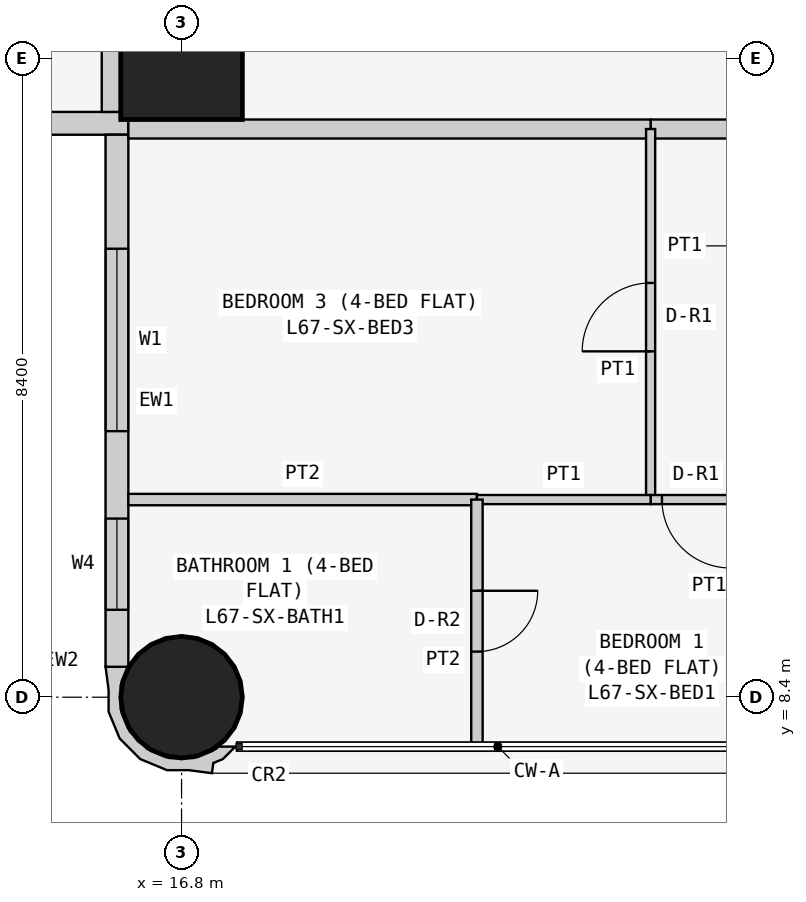
"""IFC4 building model, lengths in metres.
Left out: names, types, materials, properties, quantities, classifications, styles, units other than length and angle.
Written with IfcOpenShell. Run it as: python <this file> out.ifc"""

import sys

from ifc_helpers import new_model, si_unit, direction, frame, frame_2d, origin, origin_2d, place, context, subcontext, project, spatial, polyline, rectangle, circle, outline, extrude, element, fill, save


model = new_model("IFC4")
c1 = context("Model", 3, precision=1e-05, world=origin(), true_north=direction((0.0, 1.0)))
c2 = subcontext(c1, "Body", "Model", "MODEL_VIEW")
j1 = project(units=[si_unit("LENGTHUNIT", "METRE"), si_unit("PLANEANGLEUNIT", "RADIAN")], contexts=[c1])
p1 = place(None, origin())
s1 = spatial("IfcSite", under=j1, at=p1, CompositionType="ELEMENT")
p2 = place(p1, origin())
s2 = spatial("IfcBuilding", under=s1, at=p2, CompositionType="ELEMENT")
p3 = place(p2, frame((0.0, 0.0, 257.7)))
s3 = spatial("IfcBuildingStorey", under=s2, at=p3, CompositionType="ELEMENT", Elevation=257.7)
p4 = place(p3, frame((16.8, 8.4, 0.0), z_axis=(0.0, 0.0, 1.0), x_axis=(1.0, 0.0, 0.0)))
e1 = element("IfcColumn", 1, at=p4, inside=s3, PredefinedType="COLUMN", context=c2, shape_type="SweptSolid", body=[
    extrude(circle(Radius=0.8, at=origin_2d()), origin(), (0.0, 0.0, 1.0), 3.6),
])
p5 = place(p3, frame((16.8, 16.8, 0.0), z_axis=(0.0, 0.0, 1.0), x_axis=(1.0, 0.0, 0.0)))
e2 = element("IfcColumn", 2, at=p5, inside=s3, PredefinedType="COLUMN", context=c2, shape_type="SweptSolid", body=[
    extrude(rectangle(XDim=1.6, YDim=1.6, at=origin_2d()), origin(), (0.0, 0.0, 1.0), 3.6),
])
p6 = place(p3, frame((8.8, 15.95, 0.0), z_axis=(0.0, 0.0, 1.0), x_axis=(1.0, 0.0, 0.0)))
e3 = element("IfcWall", 3, at=p6, inside=s3, PredefinedType="SOLIDWALL", context=c2, shape_type="SweptSolid", body=[
    extrude(rectangle(XDim=7.3, YDim=0.3, at=frame_2d((3.65, 0.0))), origin(), (0.0, 0.0, 1.0), 3.45),
])
p7 = place(p6, frame((3.1, 0.0, 0.9)))
e4 = element("IfcOpeningElement", 4, at=p7, cuts=e3, PredefinedType="OPENING", context=c2, shape_type="SweptSolid", body=[
    extrude(rectangle(XDim=2.4, YDim=1.5, at=frame_2d((1.2, 0.75))), frame((0.0, 0.16, 0.0), z_axis=(0.0, -1.0, 0.0), x_axis=(1.0, 0.0, 0.0)), (0.0, 0.0, 1.0), 0.32),
])
p8 = place(p6, frame((0.75, 0.0, 0.9)))
e5 = element("IfcOpeningElement", 5, at=p8, cuts=e3, PredefinedType="OPENING", context=c2, shape_type="SweptSolid", body=[
    extrude(rectangle(XDim=1.2, YDim=1.5, at=frame_2d((0.6, 0.75))), frame((0.0, 0.16, 0.0), z_axis=(0.0, -1.0, 0.0), x_axis=(1.0, 0.0, 0.0)), (0.0, 0.0, 1.0), 0.32),
])
p9 = place(p3, frame((15.95, 15.8, 0.0), z_axis=(0.0, 0.0, 1.0), x_axis=(0.0, -1.0, 0.0)))
e6 = element("IfcWall", 6, at=p9, inside=s3, PredefinedType="SOLIDWALL", context=c2, shape_type="SweptSolid", body=[
    extrude(rectangle(XDim=7.0, YDim=0.3, at=frame_2d((3.5, 0.0))), origin(), (0.0, 0.0, 1.0), 3.45),
])
p10 = place(p9, frame((1.5, 0.0, 0.9)))
e7 = element("IfcOpeningElement", 7, at=p10, cuts=e6, PredefinedType="OPENING", context=c2, shape_type="SweptSolid", body=[
    extrude(rectangle(XDim=2.4, YDim=1.5, at=frame_2d((1.2, 0.75))), frame((0.0, 0.16, 0.0), z_axis=(0.0, -1.0, 0.0), x_axis=(1.0, 0.0, 0.0)), (0.0, 0.0, 1.0), 0.32),
])
p11 = place(p9, frame((5.05, 0.0, 0.9)))
e8 = element("IfcOpeningElement", 8, at=p11, cuts=e6, PredefinedType="OPENING", context=c2, shape_type="SweptSolid", body=[
    extrude(rectangle(XDim=1.2, YDim=1.5, at=frame_2d((0.6, 0.75))), frame((0.0, 0.16, 0.0), z_axis=(0.0, -1.0, 0.0), x_axis=(1.0, 0.0, 0.0)), (0.0, 0.0, 1.0), 0.32),
])
p12 = place(p3, frame((15.983, 8.727, 0.0), z_axis=(0.0, 0.0, 1.0), x_axis=(-0.343276641956, -0.93923434088, 0.0)))
e9 = element("IfcWall", 9, at=p12, inside=s3, PredefinedType="SOLIDWALL", context=c2, shape_type="SweptSolid", body=[
    extrude(outline(polyline([(0.829, 1.599), (0.697, 1.569), (0.604, 1.67), (0.394, 1.767), (0.471, 1.556), (0.509, 1.539), (0.724, 1.304), (0.833, 1.005), (0.82, 0.686), (0.686, 0.397), (0.451, 0.182), (0.152, 0.073), (-0.116, 0.084), (-0.127, 0.078), (-0.146, 0.071), (-0.006, -0.197), (0.266, -0.055), (0.535, 0.044), (0.817, 0.302), (0.978, 0.648), (0.994, 1.03), (0.895, 1.3), (0.829, 1.599)])), origin(), (0.0, 0.0, 1.0), 3.45),
])
p13 = place(p3, frame((24.171, 15.875, 0.0), z_axis=(0.0, 0.0, 1.0), x_axis=(-1.0, 0.0, 0.0)))
e10 = element("IfcWall", 10, at=p13, inside=s3, PredefinedType="PARTITIONING", context=c2, shape_type="SweptSolid", body=[
    extrude(rectangle(XDim=1.2, YDim=0.25, at=frame_2d((0.6, 0.0))), origin(), (0.0, 0.0, 1.0), 3.45),
])
for number, where, z_axis, x_axis in (
    (11, (22.971, 15.875, 0.0), (0.0, 0.0, 1.0), (-1.0, 0.0, 0.0)),
    (12, (15.875, 16.1, 0.0), (0.0, 0.0, 1.0), (0.0, 1.0, 0.0)),
):
    element("IfcWall", number, at=place(p3, frame(where, z_axis=z_axis, x_axis=x_axis)), inside=s3, PredefinedType="PARTITIONING", context=c2, shape_type="SweptSolid", body=[
        extrude(rectangle(XDim=6.871, YDim=0.25, at=frame_2d((3.436, 0.0))), origin(), (0.0, 0.0, 1.0), 3.45),
    ])
p14 = place(p3, frame((22.971, 11.0, 0.0), z_axis=(0.0, 0.0, 1.0), x_axis=(0.0, 1.0, 0.0)))
e13 = element("IfcWall", 13, at=p14, inside=s3, PredefinedType="PARTITIONING", context=c2, shape_type="SweptSolid", body=[
    extrude(rectangle(XDim=4.875, YDim=0.12, at=frame_2d((2.438, 0.0))), origin(), (0.0, 0.0, 1.0), 3.45),
])
p15 = place(p14, frame((1.95, 0.0, 0.0)))
e14 = element("IfcOpeningElement", 14, at=p15, cuts=e13, PredefinedType="OPENING", context=c2, shape_type="SweptSolid", body=[
    extrude(rectangle(XDim=0.9, YDim=2.1, at=frame_2d((0.45, 1.05))), frame((0.0, 0.07, 0.0), z_axis=(0.0, -1.0, 0.0), x_axis=(1.0, 0.0, 0.0)), (0.0, 0.0, 1.0), 0.14),
])
p16 = place(p3, frame((24.171, 11.0, 0.0), z_axis=(0.0, 0.0, 1.0), x_axis=(-1.0, 0.0, 0.0)))
e15 = element("IfcWall", 15, at=p16, inside=s3, PredefinedType="PARTITIONING", context=c2, shape_type="SweptSolid", body=[
    extrude(rectangle(XDim=1.2, YDim=0.12, at=frame_2d((0.6, 0.0))), origin(), (0.0, 0.0, 1.0), 3.45),
])
p17 = place(p16, frame((0.151, 0.0, 0.0)))
e16 = element("IfcOpeningElement", 16, at=p17, cuts=e15, PredefinedType="OPENING", context=c2, shape_type="SweptSolid", body=[
    extrude(rectangle(XDim=0.9, YDim=2.1, at=frame_2d((0.45, 1.05))), frame((0.0, 0.07, 0.0), z_axis=(0.0, -1.0, 0.0), x_axis=(1.0, 0.0, 0.0)), (0.0, 0.0, 1.0), 0.14),
])
p18 = place(p3, frame((16.1, 11.0, 0.0), z_axis=(0.0, 0.0, 1.0), x_axis=(1.0, 0.0, 0.0)))
e17 = element("IfcWall", 17, at=p18, inside=s3, PredefinedType="PARTITIONING", context=c2, shape_type="SweptSolid", body=[
    extrude(rectangle(XDim=4.586, YDim=0.15, at=frame_2d((2.293, 0.0))), origin(), (0.0, 0.0, 1.0), 3.45),
])
p19 = place(p3, frame((20.686, 11.0, 0.0), z_axis=(0.0, 0.0, 1.0), x_axis=(1.0, 0.0, 0.0)))
e18 = element("IfcWall", 18, at=p19, inside=s3, PredefinedType="PARTITIONING", context=c2, shape_type="SweptSolid", body=[
    extrude(rectangle(XDim=2.285, YDim=0.12, at=frame_2d((1.143, 0.0))), origin(), (0.0, 0.0, 1.0), 3.45),
])
p20 = place(p3, frame((20.686, 7.75, 0.0), z_axis=(0.0, 0.0, 1.0), x_axis=(0.0, 1.0, 0.0)))
e19 = element("IfcWall", 19, at=p20, inside=s3, PredefinedType="PARTITIONING", context=c2, shape_type="SweptSolid", body=[
    extrude(rectangle(XDim=3.25, YDim=0.15, at=frame_2d((1.625, 0.0))), origin(), (0.0, 0.0, 1.0), 3.45),
])
p21 = place(p20, frame((1.25, 0.0, 0.0)))
e20 = element("IfcOpeningElement", 20, at=p21, cuts=e19, PredefinedType="OPENING", context=c2, shape_type="SweptSolid", body=[
    extrude(rectangle(XDim=0.8, YDim=2.1, at=frame_2d((0.4, 1.05))), frame((0.0, 0.085, 0.0), z_axis=(0.0, -1.0, 0.0), x_axis=(1.0, 0.0, 0.0)), (0.0, 0.0, 1.0), 0.17),
])
p22 = place(p10, origin())
e21 = element("IfcWindow", 21, at=p22, inside=s3, PartitioningType="SINGLE_PANEL", PredefinedType="WINDOW", context=c2, shape_type="SweptSolid", body=[
    extrude(rectangle(XDim=2.4, YDim=1.5, at=frame_2d((1.2, 0.75))), frame((0.0, 0.03, 0.0), z_axis=(0.0, -1.0, 0.0), x_axis=(1.0, 0.0, 0.0)), (0.0, 0.0, 1.0), 0.06),
])
fill(e7, e21)
p23 = place(p11, origin())
e22 = element("IfcWindow", 22, at=p23, inside=s3, PartitioningType="SINGLE_PANEL", PredefinedType="WINDOW", context=c2, shape_type="SweptSolid", body=[
    extrude(rectangle(XDim=1.2, YDim=1.5, at=frame_2d((0.6, 0.75))), frame((0.0, 0.03, 0.0), z_axis=(0.0, -1.0, 0.0), x_axis=(1.0, 0.0, 0.0)), (0.0, 0.0, 1.0), 0.06),
])
fill(e8, e22)
p24 = place(p15, origin())
e23 = element("IfcDoor", 23, at=p24, inside=s3, OperationType="SINGLE_SWING_LEFT", PredefinedType="DOOR", context=c2, shape_type="SweptSolid", body=[
    extrude(rectangle(XDim=0.9, YDim=2.1, at=frame_2d((0.45, 1.05))), frame((0.0, 0.025, 0.0), z_axis=(0.0, -1.0, 0.0), x_axis=(1.0, 0.0, 0.0)), (0.0, 0.0, 1.0), 0.05),
])
fill(e14, e23)
p25 = place(p17, origin())
e24 = element("IfcDoor", 24, at=p25, inside=s3, OperationType="SINGLE_SWING_LEFT", PredefinedType="DOOR", context=c2, shape_type="SweptSolid", body=[
    extrude(rectangle(XDim=0.9, YDim=2.1, at=frame_2d((0.45, 1.05))), frame((0.0, 0.025, 0.0), z_axis=(0.0, -1.0, 0.0), x_axis=(1.0, 0.0, 0.0)), (0.0, 0.0, 1.0), 0.05),
])
fill(e16, e24)
p26 = place(p21, frame((0.8, 0.0, 0.0), z_axis=(0.0, 0.0, 1.0), x_axis=(-1.0, 0.0, 0.0)))
e25 = element("IfcDoor", 25, at=p26, inside=s3, OperationType="SINGLE_SWING_LEFT", PredefinedType="DOOR", context=c2, shape_type="SweptSolid", body=[
    extrude(rectangle(XDim=0.8, YDim=2.1, at=frame_2d((0.4, 1.05))), frame((0.0, 0.025, 0.0), z_axis=(0.0, -1.0, 0.0), x_axis=(1.0, 0.0, 0.0)), (0.0, 0.0, 1.0), 0.05),
])
fill(e20, e25)
save(model, sys.argv[1])
